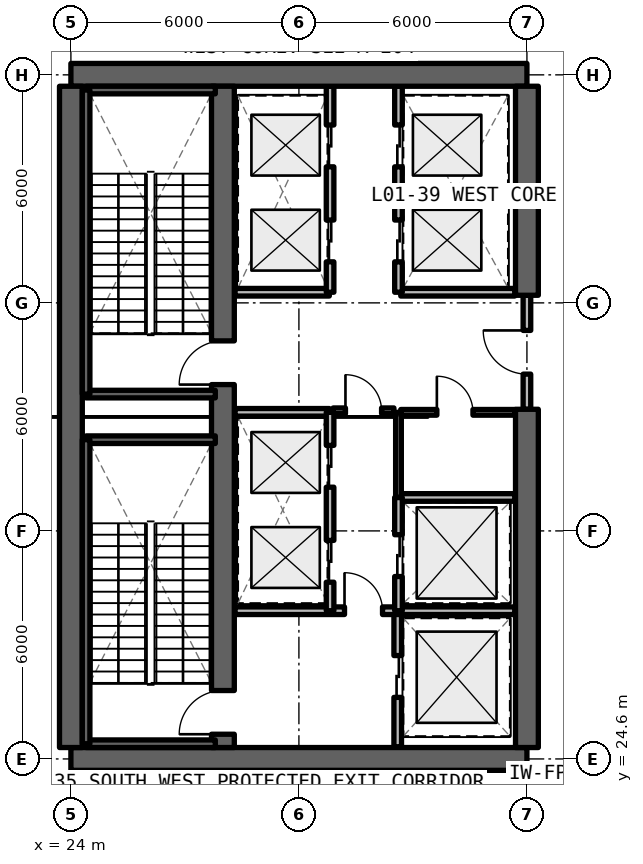
"""IFC4 building model, lengths in metres.
Left out: names, types, materials, properties, quantities, classifications, styles, units other than length and angle.
Written with IfcOpenShell. Run it as: python <this file> out.ifc"""

import sys

from ifc_helpers import new_model, si_unit, direction, frame, frame_2d, origin, place, context, subcontext, project, spatial, rectangle, extrude, element, fill, save


model = new_model("IFC4")
c1 = context("Model", 3, precision=1e-05, world=origin(), true_north=direction((0.0, 1.0)))
c2 = subcontext(c1, "Body", "Model", "MODEL_VIEW")
j1 = project(units=[si_unit("LENGTHUNIT", "METRE"), si_unit("PLANEANGLEUNIT", "RADIAN")], contexts=[c1])
p1 = place(None, origin())
s1 = spatial("IfcSite", under=j1, at=p1, CompositionType="ELEMENT")
p2 = place(p1, origin())
s2 = spatial("IfcBuilding", under=s1, at=p2, CompositionType="ELEMENT")
p3 = place(p2, origin())
s3 = spatial("IfcBuildingStorey", under=s2, at=p3, CompositionType="ELEMENT", Elevation=0.0)
for number, where, z_axis, x_axis in (
    (1, (24.0, 24.6, 0.0), (0.0, 0.0, 1.0), (1.0, 0.0, 0.0)),
    (2, (36.0, 42.6, 0.0), (0.0, 0.0, 1.0), (-1.0, 0.0, 0.0)),
):
    element("IfcWall", number, at=place(p3, frame(where, z_axis=z_axis, x_axis=x_axis)), inside=s3, PredefinedType="SHEAR", context=c2, shape_type="SweptSolid", body=[
        extrude(rectangle(XDim=12.0, YDim=0.6, at=frame_2d((6.0, 0.0))), origin(), (0.0, 0.0, 1.0), 4.95),
    ])
p4 = place(p3, frame((24.0, 24.9, 0.0), z_axis=(0.0, 0.0, 1.0), x_axis=(0.0, 1.0, 0.0)))
e3 = element("IfcWall", 3, at=p4, inside=s3, PredefinedType="SHEAR", context=c2, shape_type="SweptSolid", body=[
    extrude(rectangle(XDim=17.4, YDim=0.6, at=frame_2d((8.7, 0.0))), origin(), (0.0, 0.0, 1.0), 4.95),
])
p5 = place(p3, frame((36.0, 24.9, 0.0), z_axis=(0.0, 0.0, 1.0), x_axis=(0.0, 1.0, 0.0)))
e4 = element("IfcWall", 4, at=p5, inside=s3, PredefinedType="SHEAR", context=c2, shape_type="SweptSolid", body=[
    extrude(rectangle(XDim=8.9, YDim=0.6, at=frame_2d((4.45, 0.0))), origin(), (0.0, 0.0, 1.0), 4.95),
])
p6 = place(p3, frame((36.0, 36.8, 0.0), z_axis=(0.0, 0.0, 1.0), x_axis=(0.0, 1.0, 0.0)))
e5 = element("IfcWall", 5, at=p6, inside=s3, PredefinedType="SHEAR", context=c2, shape_type="SweptSolid", body=[
    extrude(rectangle(XDim=5.5, YDim=0.6, at=frame_2d((2.75, 0.0))), origin(), (0.0, 0.0, 1.0), 4.95),
])
p7 = place(p3, frame((28.0, 24.9, 0.0), z_axis=(0.0, 0.0, 1.0), x_axis=(0.0, 1.0, 0.0)))
e6 = element("IfcWall", 6, at=p7, inside=s3, PredefinedType="SHEAR", context=c2, shape_type="SweptSolid", body=[
    extrude(rectangle(XDim=17.4, YDim=0.6, at=frame_2d((8.7, 0.0))), origin(), (0.0, 0.0, 1.0), 4.95),
])
p8 = place(p7, frame((0.35, 0.0, 0.0)))
e7 = element("IfcOpeningElement", 7, at=p8, cuts=e6, PredefinedType="OPENING", context=c2, shape_type="SweptSolid", body=[
    extrude(rectangle(XDim=1.15, YDim=2.15, at=frame_2d((0.575, 1.075))), frame((0.0, 0.31, 0.0), z_axis=(0.0, -1.0, 0.0), x_axis=(1.0, 0.0, 0.0)), (0.0, 0.0, 1.0), 0.62),
])
p9 = place(p7, frame((9.55, 0.0, 0.0)))
e8 = element("IfcOpeningElement", 8, at=p9, cuts=e6, PredefinedType="OPENING", context=c2, shape_type="SweptSolid", body=[
    extrude(rectangle(XDim=1.15, YDim=2.15, at=frame_2d((0.575, 1.075))), frame((0.0, 0.31, 0.0), z_axis=(0.0, -1.0, 0.0), x_axis=(1.0, 0.0, 0.0)), (0.0, 0.0, 1.0), 0.62),
])
p10 = place(p3, frame((32.6, 24.92, 0.0), z_axis=(0.0, 0.0, 1.0), x_axis=(0.0, 1.0, 0.0)))
e9 = element("IfcWall", 9, at=p10, inside=s3, PredefinedType="SOLIDWALL", context=c2, shape_type="SweptSolid", body=[
    extrude(rectangle(XDim=3.58, YDim=0.2, at=frame_2d((1.79, 0.0))), origin(), (0.0, 0.0, 1.0), 3.89),
])
p11 = place(p10, frame((1.3, 0.0, 0.0)))
e10 = element("IfcOpeningElement", 10, at=p11, cuts=e9, PredefinedType="OPENING", context=c2, shape_type="SweptSolid", body=[
    extrude(rectangle(XDim=1.1, YDim=2.2, at=frame_2d((0.55, 1.1))), frame((0.0, 0.11, 0.0), z_axis=(0.0, -1.0, 0.0), x_axis=(1.0, 0.0, 0.0)), (0.0, 0.0, 1.0), 0.22),
])
p12 = place(p3, frame((28.32, 28.5, 0.0), z_axis=(0.0, 0.0, 1.0), x_axis=(1.0, 0.0, 0.0)))
e11 = element("IfcWall", 11, at=p12, inside=s3, PredefinedType="SOLIDWALL", context=c2, shape_type="SweptSolid", body=[
    extrude(rectangle(XDim=7.36, YDim=0.2, at=frame_2d((3.68, 0.0))), origin(), (0.0, 0.0, 1.0), 3.89),
])
p13 = place(p12, frame((2.88, 0.0, 0.0)))
e12 = element("IfcOpeningElement", 12, at=p13, cuts=e11, PredefinedType="OPENING", context=c2, shape_type="SweptSolid", body=[
    extrude(rectangle(XDim=1.0, YDim=2.15, at=frame_2d((0.5, 1.075))), frame((0.0, 0.11, 0.0), z_axis=(0.0, -1.0, 0.0), x_axis=(1.0, 0.0, 0.0)), (0.0, 0.0, 1.0), 0.22),
])
p14 = place(p3, frame((36.0, 33.8, 0.0), z_axis=(0.0, 0.0, 1.0), x_axis=(0.0, 1.0, 0.0)))
e13 = element("IfcWall", 13, at=p14, inside=s3, PredefinedType="SOLIDWALL", context=c2, shape_type="SweptSolid", body=[
    extrude(rectangle(XDim=3.0, YDim=0.2, at=frame_2d((1.5, 0.0))), origin(), (0.0, 0.0, 1.0), 3.89),
])
p15 = place(p14, frame((0.925, 0.0, 0.0)))
e14 = element("IfcOpeningElement", 14, at=p15, cuts=e13, PredefinedType="OPENING", context=c2, shape_type="SweptSolid", body=[
    extrude(rectangle(XDim=1.15, YDim=2.15, at=frame_2d((0.575, 1.075))), frame((0.0, 0.11, 0.0), z_axis=(0.0, -1.0, 0.0), x_axis=(1.0, 0.0, 0.0)), (0.0, 0.0, 1.0), 0.22),
])
p16 = place(p3, frame((30.9, 33.76, 0.0), z_axis=(0.0, 0.0, 1.0), x_axis=(1.0, 0.0, 0.0)))
e15 = element("IfcWall", 15, at=p16, inside=s3, PredefinedType="SOLIDWALL", context=c2, shape_type="SweptSolid", body=[
    extrude(rectangle(XDim=1.6, YDim=0.15, at=frame_2d((0.8, 0.0))), origin(), (0.0, 0.0, 1.0), 3.89),
])
p17 = place(p16, frame((0.325, 0.0, 0.0)))
e16 = element("IfcOpeningElement", 16, at=p17, cuts=e15, PredefinedType="OPENING", context=c2, shape_type="SweptSolid", body=[
    extrude(rectangle(XDim=0.95, YDim=2.15, at=frame_2d((0.475, 1.075))), frame((0.0, 0.085, 0.0), z_axis=(0.0, -1.0, 0.0), x_axis=(1.0, 0.0, 0.0)), (0.0, 0.0, 1.0), 0.17),
])
p18 = place(p3, frame((28.32, 33.72, 0.0), z_axis=(0.0, 0.0, 1.0), x_axis=(1.0, 0.0, 0.0)))
e17 = element("IfcWall", 17, at=p18, inside=s3, PredefinedType="SOLIDWALL", context=c2, shape_type="SweptSolid", body=[
    extrude(rectangle(XDim=2.48, YDim=0.2, at=frame_2d((1.24, 0.0))), origin(), (0.0, 0.0, 1.0), 3.89),
])
p19 = place(p3, frame((30.82, 28.5, 0.0), z_axis=(0.0, 0.0, 1.0), x_axis=(0.0, 1.0, 0.0)))
e18 = element("IfcWall", 18, at=p19, inside=s3, PredefinedType="SOLIDWALL", context=c2, shape_type="SweptSolid", body=[
    extrude(rectangle(XDim=5.22, YDim=0.2, at=frame_2d((2.61, 0.0))), origin(), (0.0, 0.0, 1.0), 3.89),
])
p20 = place(p19, frame((0.75, 0.0, 0.0)))
e19 = element("IfcOpeningElement", 19, at=p20, cuts=e18, PredefinedType="OPENING", context=c2, shape_type="SweptSolid", body=[
    extrude(rectangle(XDim=1.1, YDim=2.2, at=frame_2d((0.55, 1.1))), frame((0.0, 0.11, 0.0), z_axis=(0.0, -1.0, 0.0), x_axis=(1.0, 0.0, 0.0)), (0.0, 0.0, 1.0), 0.22),
])
p21 = place(p19, frame((3.25, 0.0, 0.0)))
e20 = element("IfcOpeningElement", 20, at=p21, cuts=e18, PredefinedType="OPENING", context=c2, shape_type="SweptSolid", body=[
    extrude(rectangle(XDim=1.1, YDim=2.2, at=frame_2d((0.55, 1.1))), frame((0.0, 0.11, 0.0), z_axis=(0.0, -1.0, 0.0), x_axis=(1.0, 0.0, 0.0)), (0.0, 0.0, 1.0), 0.22),
])
p22 = place(p3, frame((32.68, 31.48, 0.0), z_axis=(0.0, 0.0, 1.0), x_axis=(1.0, 0.0, 0.0)))
e21 = element("IfcWall", 21, at=p22, inside=s3, PredefinedType="SOLIDWALL", context=c2, shape_type="SweptSolid", body=[
    extrude(rectangle(XDim=3.0, YDim=0.2, at=frame_2d((1.5, 0.0))), origin(), (0.0, 0.0, 1.0), 3.89),
])
p23 = place(p3, frame((32.62, 28.5, 0.0), z_axis=(0.0, 0.0, 1.0), x_axis=(0.0, 1.0, 0.0)))
e22 = element("IfcWall", 22, at=p23, inside=s3, PredefinedType="SOLIDWALL", context=c2, shape_type="SweptSolid", body=[
    extrude(rectangle(XDim=2.98, YDim=0.2, at=frame_2d((1.49, 0.0))), origin(), (0.0, 0.0, 1.0), 3.89),
])
p24 = place(p23, frame((0.9, 0.0, 0.0)))
e23 = element("IfcOpeningElement", 23, at=p24, cuts=e22, PredefinedType="OPENING", context=c2, shape_type="SweptSolid", body=[
    extrude(rectangle(XDim=1.1, YDim=2.2, at=frame_2d((0.55, 1.1))), frame((0.0, 0.11, 0.0), z_axis=(0.0, -1.0, 0.0), x_axis=(1.0, 0.0, 0.0)), (0.0, 0.0, 1.0), 0.22),
])
p25 = place(p3, frame((32.62, 31.48, 0.0), z_axis=(0.0, 0.0, 1.0), x_axis=(0.0, 1.0, 0.0)))
e24 = element("IfcWall", 24, at=p25, inside=s3, PredefinedType="SOLIDWALL", context=c2, shape_type="SweptSolid", body=[
    extrude(rectangle(XDim=2.24, YDim=0.15, at=frame_2d((1.12, 0.0))), origin(), (0.0, 0.0, 1.0), 3.89),
])
p26 = place(p3, frame((32.68, 33.72, 0.0), z_axis=(0.0, 0.0, 1.0), x_axis=(1.0, 0.0, 0.0)))
e25 = element("IfcWall", 25, at=p26, inside=s3, PredefinedType="SOLIDWALL", context=c2, shape_type="SweptSolid", body=[
    extrude(rectangle(XDim=3.0, YDim=0.15, at=frame_2d((1.5, 0.0))), origin(), (0.0, 0.0, 1.0), 3.89),
])
p27 = place(p26, frame((0.95, 0.0, 0.0)))
e26 = element("IfcOpeningElement", 26, at=p27, cuts=e25, PredefinedType="OPENING", context=c2, shape_type="SweptSolid", body=[
    extrude(rectangle(XDim=0.95, YDim=2.15, at=frame_2d((0.475, 1.075))), frame((0.0, 0.085, 0.0), z_axis=(0.0, -1.0, 0.0), x_axis=(1.0, 0.0, 0.0)), (0.0, 0.0, 1.0), 0.17),
])
p28 = place(p3, frame((28.32, 36.88, 0.0), z_axis=(0.0, 0.0, 1.0), x_axis=(1.0, 0.0, 0.0)))
e27 = element("IfcWall", 27, at=p28, inside=s3, PredefinedType="SOLIDWALL", context=c2, shape_type="SweptSolid", body=[
    extrude(rectangle(XDim=2.48, YDim=0.2, at=frame_2d((1.24, 0.0))), origin(), (0.0, 0.0, 1.0), 3.89),
])
p29 = place(p3, frame((30.82, 36.88, 0.0), z_axis=(0.0, 0.0, 1.0), x_axis=(0.0, 1.0, 0.0)))
e28 = element("IfcWall", 28, at=p29, inside=s3, PredefinedType="SOLIDWALL", context=c2, shape_type="SweptSolid", body=[
    extrude(rectangle(XDim=5.42, YDim=0.2, at=frame_2d((2.71, 0.0))), origin(), (0.0, 0.0, 1.0), 3.89),
])
p30 = place(p29, frame((0.8, 0.0, 0.0)))
e29 = element("IfcOpeningElement", 29, at=p30, cuts=e28, PredefinedType="OPENING", context=c2, shape_type="SweptSolid", body=[
    extrude(rectangle(XDim=1.1, YDim=2.2, at=frame_2d((0.55, 1.1))), frame((0.0, 0.11, 0.0), z_axis=(0.0, -1.0, 0.0), x_axis=(1.0, 0.0, 0.0)), (0.0, 0.0, 1.0), 0.22),
])
p31 = place(p29, frame((3.3, 0.0, 0.0)))
e30 = element("IfcOpeningElement", 30, at=p31, cuts=e28, PredefinedType="OPENING", context=c2, shape_type="SweptSolid", body=[
    extrude(rectangle(XDim=1.1, YDim=2.2, at=frame_2d((0.55, 1.1))), frame((0.0, 0.11, 0.0), z_axis=(0.0, -1.0, 0.0), x_axis=(1.0, 0.0, 0.0)), (0.0, 0.0, 1.0), 0.22),
])
p32 = place(p3, frame((32.68, 36.88, 0.0), z_axis=(0.0, 0.0, 1.0), x_axis=(1.0, 0.0, 0.0)))
e31 = element("IfcWall", 31, at=p32, inside=s3, PredefinedType="SOLIDWALL", context=c2, shape_type="SweptSolid", body=[
    extrude(rectangle(XDim=3.0, YDim=0.2, at=frame_2d((1.5, 0.0))), origin(), (0.0, 0.0, 1.0), 3.89),
])
p33 = place(p3, frame((32.62, 36.88, 0.0), z_axis=(0.0, 0.0, 1.0), x_axis=(0.0, 1.0, 0.0)))
e32 = element("IfcWall", 32, at=p33, inside=s3, PredefinedType="SOLIDWALL", context=c2, shape_type="SweptSolid", body=[
    extrude(rectangle(XDim=5.42, YDim=0.2, at=frame_2d((2.71, 0.0))), origin(), (0.0, 0.0, 1.0), 3.89),
])
p34 = place(p33, frame((0.8, 0.0, 0.0)))
e33 = element("IfcOpeningElement", 33, at=p34, cuts=e32, PredefinedType="OPENING", context=c2, shape_type="SweptSolid", body=[
    extrude(rectangle(XDim=1.1, YDim=2.2, at=frame_2d((0.55, 1.1))), frame((0.0, 0.11, 0.0), z_axis=(0.0, -1.0, 0.0), x_axis=(1.0, 0.0, 0.0)), (0.0, 0.0, 1.0), 0.22),
])
p35 = place(p33, frame((3.3, 0.0, 0.0)))
e34 = element("IfcOpeningElement", 34, at=p35, cuts=e32, PredefinedType="OPENING", context=c2, shape_type="SweptSolid", body=[
    extrude(rectangle(XDim=1.1, YDim=2.2, at=frame_2d((0.55, 1.1))), frame((0.0, 0.11, 0.0), z_axis=(0.0, -1.0, 0.0), x_axis=(1.0, 0.0, 0.0)), (0.0, 0.0, 1.0), 0.22),
])
for number, where, z_axis, x_axis in (
    (35, (24.4, 25.0, 0.0), (0.0, 0.0, 1.0), (1.0, 0.0, 0.0)),
    (36, (27.8, 33.0, 0.0), (0.0, 0.0, 1.0), (-1.0, 0.0, 0.0)),
):
    element("IfcWall", number, at=place(p3, frame(where, z_axis=z_axis, x_axis=x_axis)), inside=s3, PredefinedType="SOLIDWALL", context=c2, shape_type="SweptSolid", body=[
        extrude(rectangle(XDim=3.4, YDim=0.2, at=frame_2d((1.7, 0.0))), origin(), (0.0, 0.0, 1.0), 4.95),
    ])
p36 = place(p3, frame((24.4, 33.0, 0.0), z_axis=(0.0, 0.0, 1.0), x_axis=(0.0, -1.0, 0.0)))
e37 = element("IfcWall", 37, at=p36, inside=s3, PredefinedType="SOLIDWALL", context=c2, shape_type="SweptSolid", body=[
    extrude(rectangle(XDim=8.0, YDim=0.2, at=frame_2d((4.0, 0.0))), origin(), (0.0, 0.0, 1.0), 4.95),
])
for number, where, z_axis, x_axis in (
    (38, (24.4, 34.2, 0.0), (0.0, 0.0, 1.0), (1.0, 0.0, 0.0)),
    (39, (27.8, 42.2, 0.0), (0.0, 0.0, 1.0), (-1.0, 0.0, 0.0)),
):
    element("IfcWall", number, at=place(p3, frame(where, z_axis=z_axis, x_axis=x_axis)), inside=s3, PredefinedType="SOLIDWALL", context=c2, shape_type="SweptSolid", body=[
        extrude(rectangle(XDim=3.4, YDim=0.2, at=frame_2d((1.7, 0.0))), origin(), (0.0, 0.0, 1.0), 4.95),
    ])
p37 = place(p3, frame((24.4, 42.2, 0.0), z_axis=(0.0, 0.0, 1.0), x_axis=(0.0, -1.0, 0.0)))
e40 = element("IfcWall", 40, at=p37, inside=s3, PredefinedType="SOLIDWALL", context=c2, shape_type="SweptSolid", body=[
    extrude(rectangle(XDim=8.0, YDim=0.2, at=frame_2d((4.0, 0.0))), origin(), (0.0, 0.0, 1.0), 4.95),
])
p38 = place(p11, origin())
e41 = element("IfcDoor", 41, at=p38, inside=s3, OperationType="SLIDING_TO_LEFT", PredefinedType="DOOR", context=c2, shape_type="SweptSolid", body=[
    extrude(rectangle(XDim=1.1, YDim=2.2, at=frame_2d((0.55, 1.1))), frame((0.0, 0.025, 0.0), z_axis=(0.0, -1.0, 0.0), x_axis=(1.0, 0.0, 0.0)), (0.0, 0.0, 1.0), 0.05),
])
fill(e10, e41)
p39 = place(p13, origin())
e42 = element("IfcDoor", 42, at=p39, inside=s3, OperationType="SINGLE_SWING_LEFT", PredefinedType="DOOR", context=c2, shape_type="SweptSolid", body=[
    extrude(rectangle(XDim=1.0, YDim=2.15, at=frame_2d((0.5, 1.075))), frame((0.0, 0.025, 0.0), z_axis=(0.0, -1.0, 0.0), x_axis=(1.0, 0.0, 0.0)), (0.0, 0.0, 1.0), 0.05),
])
fill(e12, e42)
p40 = place(p15, frame((1.15, 0.0, 0.0), z_axis=(0.0, 0.0, 1.0), x_axis=(-1.0, 0.0, 0.0)))
e43 = element("IfcDoor", 43, at=p40, inside=s3, OperationType="SINGLE_SWING_RIGHT", PredefinedType="DOOR", context=c2, shape_type="SweptSolid", body=[
    extrude(rectangle(XDim=1.15, YDim=2.15, at=frame_2d((0.575, 1.075))), frame((0.0, 0.025, 0.0), z_axis=(0.0, -1.0, 0.0), x_axis=(1.0, 0.0, 0.0)), (0.0, 0.0, 1.0), 0.05),
])
fill(e14, e43)
p41 = place(p17, origin())
e44 = element("IfcDoor", 44, at=p41, inside=s3, OperationType="SINGLE_SWING_LEFT", PredefinedType="DOOR", context=c2, shape_type="SweptSolid", body=[
    extrude(rectangle(XDim=0.95, YDim=2.15, at=frame_2d((0.475, 1.075))), frame((0.0, 0.025, 0.0), z_axis=(0.0, -1.0, 0.0), x_axis=(1.0, 0.0, 0.0)), (0.0, 0.0, 1.0), 0.05),
])
fill(e16, e44)
p42 = place(p20, origin())
e45 = element("IfcDoor", 45, at=p42, inside=s3, OperationType="SLIDING_TO_LEFT", PredefinedType="DOOR", context=c2, shape_type="SweptSolid", body=[
    extrude(rectangle(XDim=1.1, YDim=2.2, at=frame_2d((0.55, 1.1))), frame((0.0, 0.025, 0.0), z_axis=(0.0, -1.0, 0.0), x_axis=(1.0, 0.0, 0.0)), (0.0, 0.0, 1.0), 0.05),
])
fill(e19, e45)
p43 = place(p21, origin())
e46 = element("IfcDoor", 46, at=p43, inside=s3, OperationType="SLIDING_TO_RIGHT", PredefinedType="DOOR", context=c2, shape_type="SweptSolid", body=[
    extrude(rectangle(XDim=1.1, YDim=2.2, at=frame_2d((0.55, 1.1))), frame((0.0, 0.025, 0.0), z_axis=(0.0, -1.0, 0.0), x_axis=(1.0, 0.0, 0.0)), (0.0, 0.0, 1.0), 0.05),
])
fill(e20, e46)
p44 = place(p24, origin())
e47 = element("IfcDoor", 47, at=p44, inside=s3, OperationType="SLIDING_TO_LEFT", PredefinedType="DOOR", context=c2, shape_type="SweptSolid", body=[
    extrude(rectangle(XDim=1.1, YDim=2.2, at=frame_2d((0.55, 1.1))), frame((0.0, 0.025, 0.0), z_axis=(0.0, -1.0, 0.0), x_axis=(1.0, 0.0, 0.0)), (0.0, 0.0, 1.0), 0.05),
])
fill(e23, e47)
p45 = place(p27, origin())
e48 = element("IfcDoor", 48, at=p45, inside=s3, OperationType="SINGLE_SWING_LEFT", PredefinedType="DOOR", context=c2, shape_type="SweptSolid", body=[
    extrude(rectangle(XDim=0.95, YDim=2.15, at=frame_2d((0.475, 1.075))), frame((0.0, 0.025, 0.0), z_axis=(0.0, -1.0, 0.0), x_axis=(1.0, 0.0, 0.0)), (0.0, 0.0, 1.0), 0.05),
])
fill(e26, e48)
p46 = place(p30, origin())
e49 = element("IfcDoor", 49, at=p46, inside=s3, OperationType="SLIDING_TO_LEFT", PredefinedType="DOOR", context=c2, shape_type="SweptSolid", body=[
    extrude(rectangle(XDim=1.1, YDim=2.2, at=frame_2d((0.55, 1.1))), frame((0.0, 0.025, 0.0), z_axis=(0.0, -1.0, 0.0), x_axis=(1.0, 0.0, 0.0)), (0.0, 0.0, 1.0), 0.05),
])
fill(e29, e49)
p47 = place(p31, origin())
e50 = element("IfcDoor", 50, at=p47, inside=s3, OperationType="SLIDING_TO_RIGHT", PredefinedType="DOOR", context=c2, shape_type="SweptSolid", body=[
    extrude(rectangle(XDim=1.1, YDim=2.2, at=frame_2d((0.55, 1.1))), frame((0.0, 0.025, 0.0), z_axis=(0.0, -1.0, 0.0), x_axis=(1.0, 0.0, 0.0)), (0.0, 0.0, 1.0), 0.05),
])
fill(e30, e50)
p48 = place(p34, origin())
e51 = element("IfcDoor", 51, at=p48, inside=s3, OperationType="SLIDING_TO_LEFT", PredefinedType="DOOR", context=c2, shape_type="SweptSolid", body=[
    extrude(rectangle(XDim=1.1, YDim=2.2, at=frame_2d((0.55, 1.1))), frame((0.0, 0.025, 0.0), z_axis=(0.0, -1.0, 0.0), x_axis=(1.0, 0.0, 0.0)), (0.0, 0.0, 1.0), 0.05),
])
fill(e33, e51)
p49 = place(p35, origin())
e52 = element("IfcDoor", 52, at=p49, inside=s3, OperationType="SLIDING_TO_RIGHT", PredefinedType="DOOR", context=c2, shape_type="SweptSolid", body=[
    extrude(rectangle(XDim=1.1, YDim=2.2, at=frame_2d((0.55, 1.1))), frame((0.0, 0.025, 0.0), z_axis=(0.0, -1.0, 0.0), x_axis=(1.0, 0.0, 0.0)), (0.0, 0.0, 1.0), 0.05),
])
fill(e34, e52)
p50 = place(p8, frame((1.15, 0.0, 0.0), z_axis=(0.0, 0.0, 1.0), x_axis=(-1.0, 0.0, 0.0)))
e53 = element("IfcDoor", 53, at=p50, inside=s3, OperationType="SINGLE_SWING_LEFT", PredefinedType="DOOR", context=c2, shape_type="SweptSolid", body=[
    extrude(rectangle(XDim=1.15, YDim=2.15, at=frame_2d((0.575, 1.075))), frame((0.0, 0.025, 0.0), z_axis=(0.0, -1.0, 0.0), x_axis=(1.0, 0.0, 0.0)), (0.0, 0.0, 1.0), 0.05),
])
fill(e7, e53)
p51 = place(p9, frame((1.15, 0.0, 0.0), z_axis=(0.0, 0.0, 1.0), x_axis=(-1.0, 0.0, 0.0)))
e54 = element("IfcDoor", 54, at=p51, inside=s3, OperationType="SINGLE_SWING_RIGHT", PredefinedType="DOOR", context=c2, shape_type="SweptSolid", body=[
    extrude(rectangle(XDim=1.15, YDim=2.15, at=frame_2d((0.575, 1.075))), frame((0.0, 0.025, 0.0), z_axis=(0.0, -1.0, 0.0), x_axis=(1.0, 0.0, 0.0)), (0.0, 0.0, 1.0), 0.05),
])
fill(e8, e54)
save(model, sys.argv[1])
